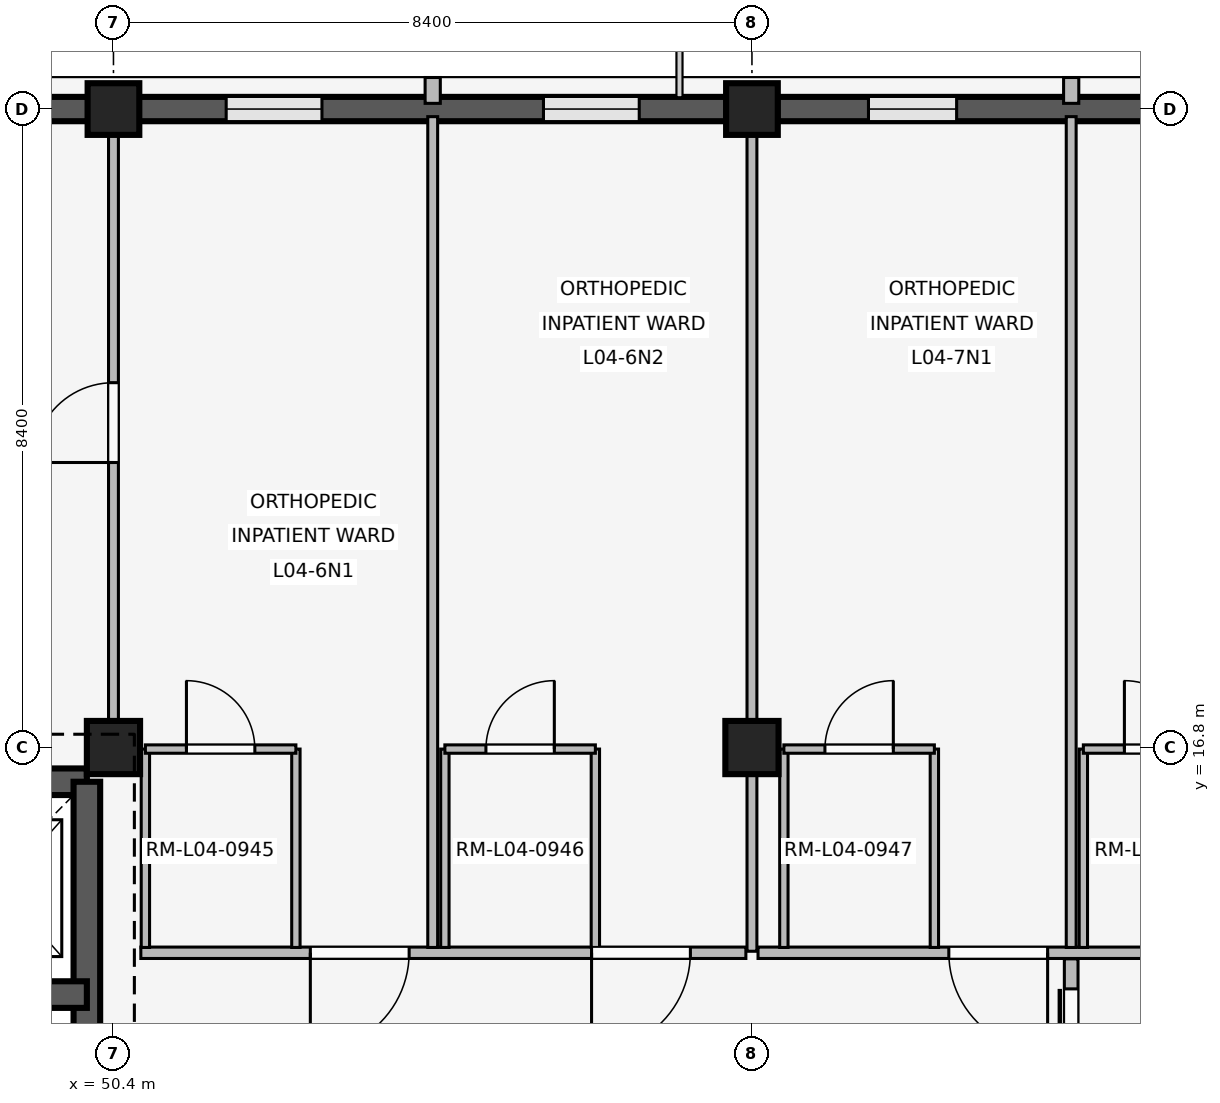
"""IFC4 building model, lengths in metres.
Left out: names, types, materials, properties, quantities, classifications, styles, units other than length and angle.
Written with IfcOpenShell. Run it as: python <this file> out.ifc"""

import sys

from ifc_helpers import new_model, si_unit, direction, frame, frame_2d, origin, origin_2d, place, context, subcontext, project, spatial, rectangle, extrude, element, fill, save


model = new_model("IFC4")
c1 = context("Model", 3, precision=1e-05, world=origin(), true_north=direction((0.0, 1.0)))
c2 = subcontext(c1, "Body", "Model", "MODEL_VIEW")
j1 = project(units=[si_unit("LENGTHUNIT", "METRE"), si_unit("PLANEANGLEUNIT", "RADIAN")], contexts=[c1])
p1 = place(None, origin())
s1 = spatial("IfcSite", under=j1, at=p1, CompositionType="ELEMENT")
p2 = place(p1, origin())
s2 = spatial("IfcBuilding", under=s1, at=p2, CompositionType="ELEMENT")
p3 = place(p2, frame((0.0, 0.0, 16.2)))
s3 = spatial("IfcBuildingStorey", under=s2, at=p3, CompositionType="ELEMENT", Elevation=16.2)
p4 = place(p3, frame((50.4, 16.8, 0.0), z_axis=(0.0, 0.0, 1.0), x_axis=(1.0, 0.0, 0.0)))
e1 = element("IfcColumn", 1, at=p4, inside=s3, PredefinedType="COLUMN", context=c2, shape_type="SweptSolid", body=[
    extrude(rectangle(XDim=0.7, YDim=0.7, at=origin_2d()), origin(), (0.0, 0.0, 1.0), 4.2),
])
p5 = place(p3, frame((50.4, 25.2, 0.0), z_axis=(0.0, 0.0, 1.0), x_axis=(1.0, 0.0, 0.0)))
e2 = element("IfcColumn", 2, at=p5, inside=s3, PredefinedType="COLUMN", context=c2, shape_type="SweptSolid", body=[
    extrude(rectangle(XDim=0.68, YDim=0.68, at=origin_2d()), origin(), (0.0, 0.0, 1.0), 4.2),
])
p6 = place(p3, frame((58.8, 16.8, 0.0), z_axis=(0.0, 0.0, 1.0), x_axis=(1.0, 0.0, 0.0)))
e3 = element("IfcColumn", 3, at=p6, inside=s3, PredefinedType="COLUMN", context=c2, shape_type="SweptSolid", body=[
    extrude(rectangle(XDim=0.7, YDim=0.7, at=origin_2d()), origin(), (0.0, 0.0, 1.0), 4.2),
])
p7 = place(p3, frame((58.8, 25.2, 0.0), z_axis=(0.0, 0.0, 1.0), x_axis=(1.0, 0.0, 0.0)))
e4 = element("IfcColumn", 4, at=p7, inside=s3, PredefinedType="COLUMN", context=c2, shape_type="SweptSolid", body=[
    extrude(rectangle(XDim=0.68, YDim=0.68, at=origin_2d()), origin(), (0.0, 0.0, 1.0), 4.2),
])
p8 = place(p3, frame((42.335, 25.2, 0.0), z_axis=(0.0, 0.0, 1.0), x_axis=(1.0, 0.0, 0.0)))
e5 = element("IfcWall", 5, at=p8, inside=s3, PredefinedType="SOLIDWALL", context=c2, shape_type="SweptSolid", body=[
    extrude(rectangle(XDim=7.73, YDim=0.32, at=frame_2d((3.865, 0.0))), origin(), (0.0, 0.0, 1.0), 3.32),
])
p9 = place(p8, frame((1.118, 0.0, 0.85)))
e6 = element("IfcOpeningElement", 6, at=p9, cuts=e5, PredefinedType="OPENING", context=c2, shape_type="SweptSolid", body=[
    extrude(rectangle(XDim=1.32, YDim=1.58, at=frame_2d((0.66, 0.79))), frame((0.0, 0.17, 0.0), z_axis=(0.0, -1.0, 0.0), x_axis=(1.0, 0.0, 0.0)), (0.0, 0.0, 1.0), 0.34),
])
p10 = place(p8, frame((5.292, 0.0, 0.85)))
e7 = element("IfcOpeningElement", 7, at=p10, cuts=e5, PredefinedType="OPENING", context=c2, shape_type="SweptSolid", body=[
    extrude(rectangle(XDim=1.32, YDim=1.58, at=frame_2d((0.66, 0.79))), frame((0.0, 0.17, 0.0), z_axis=(0.0, -1.0, 0.0), x_axis=(1.0, 0.0, 0.0)), (0.0, 0.0, 1.0), 0.34),
])
p11 = place(p3, frame((50.735, 25.2, 0.0), z_axis=(0.0, 0.0, 1.0), x_axis=(1.0, 0.0, 0.0)))
e8 = element("IfcWall", 8, at=p11, inside=s3, PredefinedType="SOLIDWALL", context=c2, shape_type="SweptSolid", body=[
    extrude(rectangle(XDim=7.73, YDim=0.32, at=frame_2d((3.865, 0.0))), origin(), (0.0, 0.0, 1.0), 3.32),
])
p12 = place(p11, frame((1.148, 0.0, 0.85)))
e9 = element("IfcOpeningElement", 9, at=p12, cuts=e8, PredefinedType="OPENING", context=c2, shape_type="SweptSolid", body=[
    extrude(rectangle(XDim=1.26, YDim=1.52, at=frame_2d((0.63, 0.76))), frame((0.0, 0.17, 0.0), z_axis=(0.0, -1.0, 0.0), x_axis=(1.0, 0.0, 0.0)), (0.0, 0.0, 1.0), 0.34),
])
p13 = place(p11, frame((5.322, 0.0, 0.85)))
e10 = element("IfcOpeningElement", 10, at=p13, cuts=e8, PredefinedType="OPENING", context=c2, shape_type="SweptSolid", body=[
    extrude(rectangle(XDim=1.26, YDim=1.52, at=frame_2d((0.63, 0.76))), frame((0.0, 0.17, 0.0), z_axis=(0.0, -1.0, 0.0), x_axis=(1.0, 0.0, 0.0)), (0.0, 0.0, 1.0), 0.34),
])
p14 = place(p3, frame((54.6, 25.275, 0.0), z_axis=(0.0, 0.0, 1.0), x_axis=(0.0, 1.0, 0.0)))
e11 = element("IfcWall", 11, at=p14, inside=s3, PredefinedType="ELEMENTEDWALL", context=c2, shape_type="SweptSolid", body=[
    extrude(rectangle(XDim=0.34, YDim=0.2, at=frame_2d((0.17, 0.0))), origin(), (0.0, 0.0, 1.0), 3.3),
])
p15 = place(p3, frame((59.135, 25.2, 0.0), z_axis=(0.0, 0.0, 1.0), x_axis=(1.0, 0.0, 0.0)))
e12 = element("IfcWall", 12, at=p15, inside=s3, PredefinedType="SOLIDWALL", context=c2, shape_type="SweptSolid", body=[
    extrude(rectangle(XDim=7.73, YDim=0.32, at=frame_2d((3.865, 0.0))), origin(), (0.0, 0.0, 1.0), 3.32),
])
p16 = place(p15, frame((1.198, 0.0, 0.85)))
e13 = element("IfcOpeningElement", 13, at=p16, cuts=e12, PredefinedType="OPENING", context=c2, shape_type="SweptSolid", body=[
    extrude(rectangle(XDim=1.16, YDim=1.48, at=frame_2d((0.58, 0.74))), frame((0.0, 0.17, 0.0), z_axis=(0.0, -1.0, 0.0), x_axis=(1.0, 0.0, 0.0)), (0.0, 0.0, 1.0), 0.34),
])
p17 = place(p15, frame((5.372, 0.0, 0.85)))
e14 = element("IfcOpeningElement", 14, at=p17, cuts=e12, PredefinedType="OPENING", context=c2, shape_type="SweptSolid", body=[
    extrude(rectangle(XDim=1.16, YDim=1.48, at=frame_2d((0.58, 0.74))), frame((0.0, 0.17, 0.0), z_axis=(0.0, -1.0, 0.0), x_axis=(1.0, 0.0, 0.0)), (0.0, 0.0, 1.0), 0.34),
])
p18 = place(p3, frame((63.0, 25.275, 0.0), z_axis=(0.0, 0.0, 1.0), x_axis=(0.0, 1.0, 0.0)))
e15 = element("IfcWall", 15, at=p18, inside=s3, PredefinedType="ELEMENTEDWALL", context=c2, shape_type="SweptSolid", body=[
    extrude(rectangle(XDim=0.34, YDim=0.2, at=frame_2d((0.17, 0.0))), origin(), (0.0, 0.0, 1.0), 3.3),
])
p19 = place(p3, frame((42.55, 16.35, 0.0), z_axis=(0.0, 0.0, 1.0), x_axis=(1.0, 0.0, 0.0)))
e16 = element("IfcWall", 16, at=p19, inside=s3, PredefinedType="SHEAR", context=c2, shape_type="SweptSolid", body=[
    extrude(rectangle(XDim=7.5, YDim=0.35, at=frame_2d((3.75, 0.0))), origin(), (0.0, 0.0, 1.0), 3.92),
])
p20 = place(p3, frame((50.05, 8.8, 0.0), z_axis=(0.0, 0.0, 1.0), x_axis=(0.0, 1.0, 0.0)))
e17 = element("IfcWall", 17, at=p20, inside=s3, PredefinedType="SHEAR", context=c2, shape_type="SweptSolid", body=[
    extrude(rectangle(XDim=7.55, YDim=0.35, at=frame_2d((3.775, 0.0))), origin(), (0.0, 0.0, 1.0), 3.92),
])
p21 = place(p20, frame((2.4, 0.0, 0.0)))
e18 = element("IfcOpeningElement", 18, at=p21, cuts=e17, PredefinedType="OPENING", context=c2, shape_type="SweptSolid", body=[
    extrude(rectangle(XDim=1.2, YDim=2.2, at=frame_2d((0.6, 1.1))), frame((0.0, 0.185, 0.0), z_axis=(0.0, -1.0, 0.0), x_axis=(1.0, 0.0, 0.0)), (0.0, 0.0, 1.0), 0.37),
])
p22 = place(p3, frame((46.25, 13.55, 0.0), z_axis=(0.0, 0.0, 1.0), x_axis=(1.0, 0.0, 0.0)))
e19 = element("IfcWall", 19, at=p22, inside=s3, PredefinedType="SHEAR", context=c2, shape_type="SweptSolid", body=[
    extrude(rectangle(XDim=3.8, YDim=0.35, at=frame_2d((1.9, 0.0))), origin(), (0.0, 0.0, 1.0), 3.92),
])
p23 = place(p22, frame((0.32, 0.0, 0.0)))
e20 = element("IfcOpeningElement", 20, at=p23, cuts=e19, PredefinedType="OPENING", context=c2, shape_type="SweptSolid", body=[
    extrude(rectangle(XDim=1.4, YDim=2.25, at=frame_2d((0.7, 1.125))), frame((0.0, 0.185, 0.0), z_axis=(0.0, -1.0, 0.0), x_axis=(1.0, 0.0, 0.0)), (0.0, 0.0, 1.0), 0.37),
])
p24 = place(p22, frame((2.04, 0.0, 0.0)))
e21 = element("IfcOpeningElement", 21, at=p24, cuts=e19, PredefinedType="OPENING", context=c2, shape_type="SweptSolid", body=[
    extrude(rectangle(XDim=1.1, YDim=2.15, at=frame_2d((0.55, 1.075))), frame((0.0, 0.185, 0.0), z_axis=(0.0, -1.0, 0.0), x_axis=(1.0, 0.0, 0.0)), (0.0, 0.0, 1.0), 0.37),
])
p25 = place(p3, frame((50.4, 17.15, 0.0), z_axis=(0.0, 0.0, 1.0), x_axis=(0.0, 1.0, 0.0)))
e22 = element("IfcWall", 22, at=p25, inside=s3, PredefinedType="PARTITIONING", context=c2, shape_type="SweptSolid", body=[
    extrude(rectangle(XDim=7.91, YDim=0.13, at=frame_2d((3.955, 0.0))), origin(), (0.0, 0.0, 1.0), 3.3),
])
p26 = place(p25, frame((3.4, 0.0, 0.0)))
e23 = element("IfcOpeningElement", 23, at=p26, cuts=e22, PredefinedType="OPENING", context=c2, shape_type="SweptSolid", body=[
    extrude(rectangle(XDim=1.05, YDim=2.2, at=frame_2d((0.525, 1.1))), frame((0.0, 0.075, 0.0), z_axis=(0.0, -1.0, 0.0), x_axis=(1.0, 0.0, 0.0)), (0.0, 0.0, 1.0), 0.15),
])
p27 = place(p3, frame((58.72, 14.1, 0.0), z_axis=(0.0, 0.0, 1.0), x_axis=(-1.0, 0.0, 0.0)))
e24 = element("IfcWall", 24, at=p27, inside=s3, PredefinedType="PARTITIONING", context=c2, shape_type="SweptSolid", body=[
    extrude(rectangle(XDim=7.96, YDim=0.15, at=frame_2d((3.98, 0.0))), origin(), (0.0, 0.0, 1.0), 3.3),
])
p28 = place(p27, frame((0.73, 0.0, 0.0)))
e25 = element("IfcOpeningElement", 25, at=p28, cuts=e24, PredefinedType="OPENING", context=c2, shape_type="SweptSolid", body=[
    extrude(rectangle(XDim=1.3, YDim=2.25, at=frame_2d((0.65, 1.125))), frame((0.0, 0.085, 0.0), z_axis=(0.0, -1.0, 0.0), x_axis=(1.0, 0.0, 0.0)), (0.0, 0.0, 1.0), 0.17),
])
p29 = place(p27, frame((4.43, 0.0, 0.0)))
e26 = element("IfcOpeningElement", 26, at=p29, cuts=e24, PredefinedType="OPENING", context=c2, shape_type="SweptSolid", body=[
    extrude(rectangle(XDim=1.3, YDim=2.25, at=frame_2d((0.65, 1.125))), frame((0.0, 0.085, 0.0), z_axis=(0.0, -1.0, 0.0), x_axis=(1.0, 0.0, 0.0)), (0.0, 0.0, 1.0), 0.17),
])
p30 = place(p3, frame((54.6, 14.17, 0.0), z_axis=(0.0, 0.0, 1.0), x_axis=(0.0, 1.0, 0.0)))
e27 = element("IfcWall", 27, at=p30, inside=s3, PredefinedType="PARTITIONING", context=c2, shape_type="SweptSolid", body=[
    extrude(rectangle(XDim=10.93, YDim=0.13, at=frame_2d((5.465, 0.0))), origin(), (0.0, 0.0, 1.0), 3.3),
])
for number, where, z_axis, x_axis in (
    (28, (50.82, 14.17, 0.0), (0.0, 0.0, 1.0), (0.0, 1.0, 0.0)),
    (29, (52.8, 14.17, 0.0), (0.0, 0.0, 1.0), (0.0, 1.0, 0.0)),
):
    element("IfcWall", number, at=place(p3, frame(where, z_axis=z_axis, x_axis=x_axis)), inside=s3, PredefinedType="PARTITIONING", context=c2, shape_type="SweptSolid", body=[
        extrude(rectangle(XDim=2.61, YDim=0.11, at=frame_2d((1.305, 0.0))), origin(), (0.0, 0.0, 1.0), 3.3),
    ])
p31 = place(p3, frame((50.82, 16.78, 0.0), z_axis=(0.0, 0.0, 1.0), x_axis=(1.0, 0.0, 0.0)))
e30 = element("IfcWall", 30, at=p31, inside=s3, PredefinedType="PARTITIONING", context=c2, shape_type="SweptSolid", body=[
    extrude(rectangle(XDim=1.98, YDim=0.11, at=frame_2d((0.99, 0.0))), origin(), (0.0, 0.0, 1.0), 3.3),
])
p32 = place(p31, frame((0.54, 0.0, 0.0)))
e31 = element("IfcOpeningElement", 31, at=p32, cuts=e30, PredefinedType="OPENING", context=c2, shape_type="SweptSolid", body=[
    extrude(rectangle(XDim=0.9, YDim=2.1, at=frame_2d((0.45, 1.05))), frame((0.0, 0.065, 0.0), z_axis=(0.0, -1.0, 0.0), x_axis=(1.0, 0.0, 0.0)), (0.0, 0.0, 1.0), 0.13),
])
for number, where, z_axis, x_axis in (
    (32, (54.76, 14.17, 0.0), (0.0, 0.0, 1.0), (0.0, 1.0, 0.0)),
    (33, (56.74, 14.17, 0.0), (0.0, 0.0, 1.0), (0.0, 1.0, 0.0)),
):
    element("IfcWall", number, at=place(p3, frame(where, z_axis=z_axis, x_axis=x_axis)), inside=s3, PredefinedType="PARTITIONING", context=c2, shape_type="SweptSolid", body=[
        extrude(rectangle(XDim=2.61, YDim=0.11, at=frame_2d((1.305, 0.0))), origin(), (0.0, 0.0, 1.0), 3.3),
    ])
p33 = place(p3, frame((54.76, 16.78, 0.0), z_axis=(0.0, 0.0, 1.0), x_axis=(1.0, 0.0, 0.0)))
e34 = element("IfcWall", 34, at=p33, inside=s3, PredefinedType="PARTITIONING", context=c2, shape_type="SweptSolid", body=[
    extrude(rectangle(XDim=1.98, YDim=0.11, at=frame_2d((0.99, 0.0))), origin(), (0.0, 0.0, 1.0), 3.3),
])
p34 = place(p33, frame((0.54, 0.0, 0.0)))
e35 = element("IfcOpeningElement", 35, at=p34, cuts=e34, PredefinedType="OPENING", context=c2, shape_type="SweptSolid", body=[
    extrude(rectangle(XDim=0.9, YDim=2.1, at=frame_2d((0.45, 1.05))), frame((0.0, 0.065, 0.0), z_axis=(0.0, -1.0, 0.0), x_axis=(1.0, 0.0, 0.0)), (0.0, 0.0, 1.0), 0.13),
])
p35 = place(p3, frame((58.8, 14.12, 0.0), z_axis=(0.0, 0.0, 1.0), x_axis=(0.0, 1.0, 0.0)))
e36 = element("IfcWall", 36, at=p35, inside=s3, PredefinedType="PARTITIONING", context=c2, shape_type="SweptSolid", body=[
    extrude(rectangle(XDim=10.94, YDim=0.13, at=frame_2d((5.47, 0.0))), origin(), (0.0, 0.0, 1.0), 3.3),
])
p36 = place(p3, frame((67.12, 14.1, 0.0), z_axis=(0.0, 0.0, 1.0), x_axis=(-1.0, 0.0, 0.0)))
e37 = element("IfcWall", 37, at=p36, inside=s3, PredefinedType="PARTITIONING", context=c2, shape_type="SweptSolid", body=[
    extrude(rectangle(XDim=8.24, YDim=0.15, at=frame_2d((4.12, 0.0))), origin(), (0.0, 0.0, 1.0), 3.3),
])
p37 = place(p36, frame((0.73, 0.0, 0.0)))
e38 = element("IfcOpeningElement", 38, at=p37, cuts=e37, PredefinedType="OPENING", context=c2, shape_type="SweptSolid", body=[
    extrude(rectangle(XDim=1.3, YDim=2.25, at=frame_2d((0.65, 1.125))), frame((0.0, 0.085, 0.0), z_axis=(0.0, -1.0, 0.0), x_axis=(1.0, 0.0, 0.0)), (0.0, 0.0, 1.0), 0.17),
])
p38 = place(p36, frame((4.43, 0.0, 0.0)))
e39 = element("IfcOpeningElement", 39, at=p38, cuts=e37, PredefinedType="OPENING", context=c2, shape_type="SweptSolid", body=[
    extrude(rectangle(XDim=1.3, YDim=2.25, at=frame_2d((0.65, 1.125))), frame((0.0, 0.085, 0.0), z_axis=(0.0, -1.0, 0.0), x_axis=(1.0, 0.0, 0.0)), (0.0, 0.0, 1.0), 0.17),
])
p39 = place(p3, frame((63.0, 14.17, 0.0), z_axis=(0.0, 0.0, 1.0), x_axis=(0.0, 1.0, 0.0)))
e40 = element("IfcWall", 40, at=p39, inside=s3, PredefinedType="PARTITIONING", context=c2, shape_type="SweptSolid", body=[
    extrude(rectangle(XDim=10.93, YDim=0.13, at=frame_2d((5.465, 0.0))), origin(), (0.0, 0.0, 1.0), 3.3),
])
for number, where, z_axis, x_axis in (
    (41, (59.22, 14.17, 0.0), (0.0, 0.0, 1.0), (0.0, 1.0, 0.0)),
    (42, (61.2, 14.17, 0.0), (0.0, 0.0, 1.0), (0.0, 1.0, 0.0)),
):
    element("IfcWall", number, at=place(p3, frame(where, z_axis=z_axis, x_axis=x_axis)), inside=s3, PredefinedType="PARTITIONING", context=c2, shape_type="SweptSolid", body=[
        extrude(rectangle(XDim=2.61, YDim=0.11, at=frame_2d((1.305, 0.0))), origin(), (0.0, 0.0, 1.0), 3.3),
    ])
p40 = place(p3, frame((59.22, 16.78, 0.0), z_axis=(0.0, 0.0, 1.0), x_axis=(1.0, 0.0, 0.0)))
e43 = element("IfcWall", 43, at=p40, inside=s3, PredefinedType="PARTITIONING", context=c2, shape_type="SweptSolid", body=[
    extrude(rectangle(XDim=1.98, YDim=0.11, at=frame_2d((0.99, 0.0))), origin(), (0.0, 0.0, 1.0), 3.3),
])
p41 = place(p40, frame((0.54, 0.0, 0.0)))
e44 = element("IfcOpeningElement", 44, at=p41, cuts=e43, PredefinedType="OPENING", context=c2, shape_type="SweptSolid", body=[
    extrude(rectangle(XDim=0.9, YDim=2.1, at=frame_2d((0.45, 1.05))), frame((0.0, 0.065, 0.0), z_axis=(0.0, -1.0, 0.0), x_axis=(1.0, 0.0, 0.0)), (0.0, 0.0, 1.0), 0.13),
])
p42 = place(p3, frame((63.16, 14.17, 0.0), z_axis=(0.0, 0.0, 1.0), x_axis=(0.0, 1.0, 0.0)))
e45 = element("IfcWall", 45, at=p42, inside=s3, PredefinedType="PARTITIONING", context=c2, shape_type="SweptSolid", body=[
    extrude(rectangle(XDim=2.61, YDim=0.11, at=frame_2d((1.305, 0.0))), origin(), (0.0, 0.0, 1.0), 3.3),
])
p43 = place(p3, frame((63.16, 16.78, 0.0), z_axis=(0.0, 0.0, 1.0), x_axis=(1.0, 0.0, 0.0)))
e46 = element("IfcWall", 46, at=p43, inside=s3, PredefinedType="PARTITIONING", context=c2, shape_type="SweptSolid", body=[
    extrude(rectangle(XDim=1.98, YDim=0.11, at=frame_2d((0.99, 0.0))), origin(), (0.0, 0.0, 1.0), 3.3),
])
p44 = place(p43, frame((0.54, 0.0, 0.0)))
e47 = element("IfcOpeningElement", 47, at=p44, cuts=e46, PredefinedType="OPENING", context=c2, shape_type="SweptSolid", body=[
    extrude(rectangle(XDim=0.9, YDim=2.1, at=frame_2d((0.45, 1.05))), frame((0.0, 0.065, 0.0), z_axis=(0.0, -1.0, 0.0), x_axis=(1.0, 0.0, 0.0)), (0.0, 0.0, 1.0), 0.13),
])
p45 = place(p3, frame((63.0, 11.18, 0.0), z_axis=(0.0, 0.0, 1.0), x_axis=(0.0, 1.0, 0.0)))
e48 = element("IfcWall", 48, at=p45, inside=s3, PredefinedType="PARTITIONING", context=c2, shape_type="SweptSolid", body=[
    extrude(rectangle(XDim=2.84, YDim=0.18, at=frame_2d((1.42, 0.0))), origin(), (0.0, 0.0, 1.0), 3.3),
])
p46 = place(p45, frame((0.395, 0.0, 0.0)))
e49 = element("IfcOpeningElement", 49, at=p46, cuts=e48, PredefinedType="OPENING", context=c2, shape_type="SweptSolid", body=[
    extrude(rectangle(XDim=2.05, YDim=2.35, at=frame_2d((1.025, 1.175))), frame((0.0, 0.1, 0.0), z_axis=(0.0, -1.0, 0.0), x_axis=(1.0, 0.0, 0.0)), (0.0, 0.0, 1.0), 0.2),
])
p47 = place(p12, origin())
e50 = element("IfcWindow", 50, at=p47, inside=s3, PartitioningType="SINGLE_PANEL", PredefinedType="WINDOW", context=c2, shape_type="SweptSolid", body=[
    extrude(rectangle(XDim=1.26, YDim=1.52, at=frame_2d((0.63, 0.76))), frame((0.0, 0.03, 0.0), z_axis=(0.0, -1.0, 0.0), x_axis=(1.0, 0.0, 0.0)), (0.0, 0.0, 1.0), 0.06),
])
fill(e9, e50)
p48 = place(p13, origin())
e51 = element("IfcWindow", 51, at=p48, inside=s3, PartitioningType="SINGLE_PANEL", PredefinedType="WINDOW", context=c2, shape_type="SweptSolid", body=[
    extrude(rectangle(XDim=1.26, YDim=1.52, at=frame_2d((0.63, 0.76))), frame((0.0, 0.03, 0.0), z_axis=(0.0, -1.0, 0.0), x_axis=(1.0, 0.0, 0.0)), (0.0, 0.0, 1.0), 0.06),
])
fill(e10, e51)
p49 = place(p16, origin())
e52 = element("IfcWindow", 52, at=p49, inside=s3, PartitioningType="SINGLE_PANEL", PredefinedType="WINDOW", context=c2, shape_type="SweptSolid", body=[
    extrude(rectangle(XDim=1.16, YDim=1.48, at=frame_2d((0.58, 0.74))), frame((0.0, 0.03, 0.0), z_axis=(0.0, -1.0, 0.0), x_axis=(1.0, 0.0, 0.0)), (0.0, 0.0, 1.0), 0.06),
])
fill(e13, e52)
p50 = place(p26, origin())
e53 = element("IfcDoor", 53, at=p50, inside=s3, OperationType="SINGLE_SWING_LEFT", PredefinedType="DOOR", context=c2, shape_type="SweptSolid", body=[
    extrude(rectangle(XDim=1.05, YDim=2.2, at=frame_2d((0.525, 1.1))), frame((0.0, 0.025, 0.0), z_axis=(0.0, -1.0, 0.0), x_axis=(1.0, 0.0, 0.0)), (0.0, 0.0, 1.0), 0.05),
])
fill(e23, e53)
p51 = place(p28, origin())
e54 = element("IfcDoor", 54, at=p51, inside=s3, OperationType="SINGLE_SWING_RIGHT", PredefinedType="DOOR", context=c2, shape_type="SweptSolid", body=[
    extrude(rectangle(XDim=1.3, YDim=2.25, at=frame_2d((0.65, 1.125))), frame((0.0, 0.025, 0.0), z_axis=(0.0, -1.0, 0.0), x_axis=(1.0, 0.0, 0.0)), (0.0, 0.0, 1.0), 0.05),
])
fill(e25, e54)
p52 = place(p29, origin())
e55 = element("IfcDoor", 55, at=p52, inside=s3, OperationType="SINGLE_SWING_RIGHT", PredefinedType="DOOR", context=c2, shape_type="SweptSolid", body=[
    extrude(rectangle(XDim=1.3, YDim=2.25, at=frame_2d((0.65, 1.125))), frame((0.0, 0.025, 0.0), z_axis=(0.0, -1.0, 0.0), x_axis=(1.0, 0.0, 0.0)), (0.0, 0.0, 1.0), 0.05),
])
fill(e26, e55)
p53 = place(p32, origin())
e56 = element("IfcDoor", 56, at=p53, inside=s3, OperationType="SINGLE_SWING_LEFT", PredefinedType="DOOR", context=c2, shape_type="SweptSolid", body=[
    extrude(rectangle(XDim=0.9, YDim=2.1, at=frame_2d((0.45, 1.05))), frame((0.0, 0.025, 0.0), z_axis=(0.0, -1.0, 0.0), x_axis=(1.0, 0.0, 0.0)), (0.0, 0.0, 1.0), 0.05),
])
fill(e31, e56)
p54 = place(p34, origin())
e57 = element("IfcDoor", 57, at=p54, inside=s3, OperationType="SINGLE_SWING_RIGHT", PredefinedType="DOOR", context=c2, shape_type="SweptSolid", body=[
    extrude(rectangle(XDim=0.9, YDim=2.1, at=frame_2d((0.45, 1.05))), frame((0.0, 0.025, 0.0), z_axis=(0.0, -1.0, 0.0), x_axis=(1.0, 0.0, 0.0)), (0.0, 0.0, 1.0), 0.05),
])
fill(e35, e57)
p55 = place(p38, origin())
e58 = element("IfcDoor", 58, at=p55, inside=s3, OperationType="SINGLE_SWING_LEFT", PredefinedType="DOOR", context=c2, shape_type="SweptSolid", body=[
    extrude(rectangle(XDim=1.3, YDim=2.25, at=frame_2d((0.65, 1.125))), frame((0.0, 0.025, 0.0), z_axis=(0.0, -1.0, 0.0), x_axis=(1.0, 0.0, 0.0)), (0.0, 0.0, 1.0), 0.05),
])
fill(e39, e58)
p56 = place(p41, origin())
e59 = element("IfcDoor", 59, at=p56, inside=s3, OperationType="SINGLE_SWING_RIGHT", PredefinedType="DOOR", context=c2, shape_type="SweptSolid", body=[
    extrude(rectangle(XDim=0.9, YDim=2.1, at=frame_2d((0.45, 1.05))), frame((0.0, 0.025, 0.0), z_axis=(0.0, -1.0, 0.0), x_axis=(1.0, 0.0, 0.0)), (0.0, 0.0, 1.0), 0.05),
])
fill(e44, e59)
p57 = place(p44, origin())
e60 = element("IfcDoor", 60, at=p57, inside=s3, OperationType="SINGLE_SWING_LEFT", PredefinedType="DOOR", context=c2, shape_type="SweptSolid", body=[
    extrude(rectangle(XDim=0.9, YDim=2.1, at=frame_2d((0.45, 1.05))), frame((0.0, 0.025, 0.0), z_axis=(0.0, -1.0, 0.0), x_axis=(1.0, 0.0, 0.0)), (0.0, 0.0, 1.0), 0.05),
])
fill(e47, e60)
p58 = place(p46, origin())
e61 = element("IfcDoor", 61, at=p58, inside=s3, OperationType="SLIDING_TO_LEFT", PredefinedType="DOOR", context=c2, shape_type="SweptSolid", body=[
    extrude(rectangle(XDim=2.05, YDim=2.35, at=frame_2d((1.025, 1.175))), frame((0.0, 0.025, 0.0), z_axis=(0.0, -1.0, 0.0), x_axis=(1.0, 0.0, 0.0)), (0.0, 0.0, 1.0), 0.05),
])
fill(e49, e61)
save(model, sys.argv[1])
